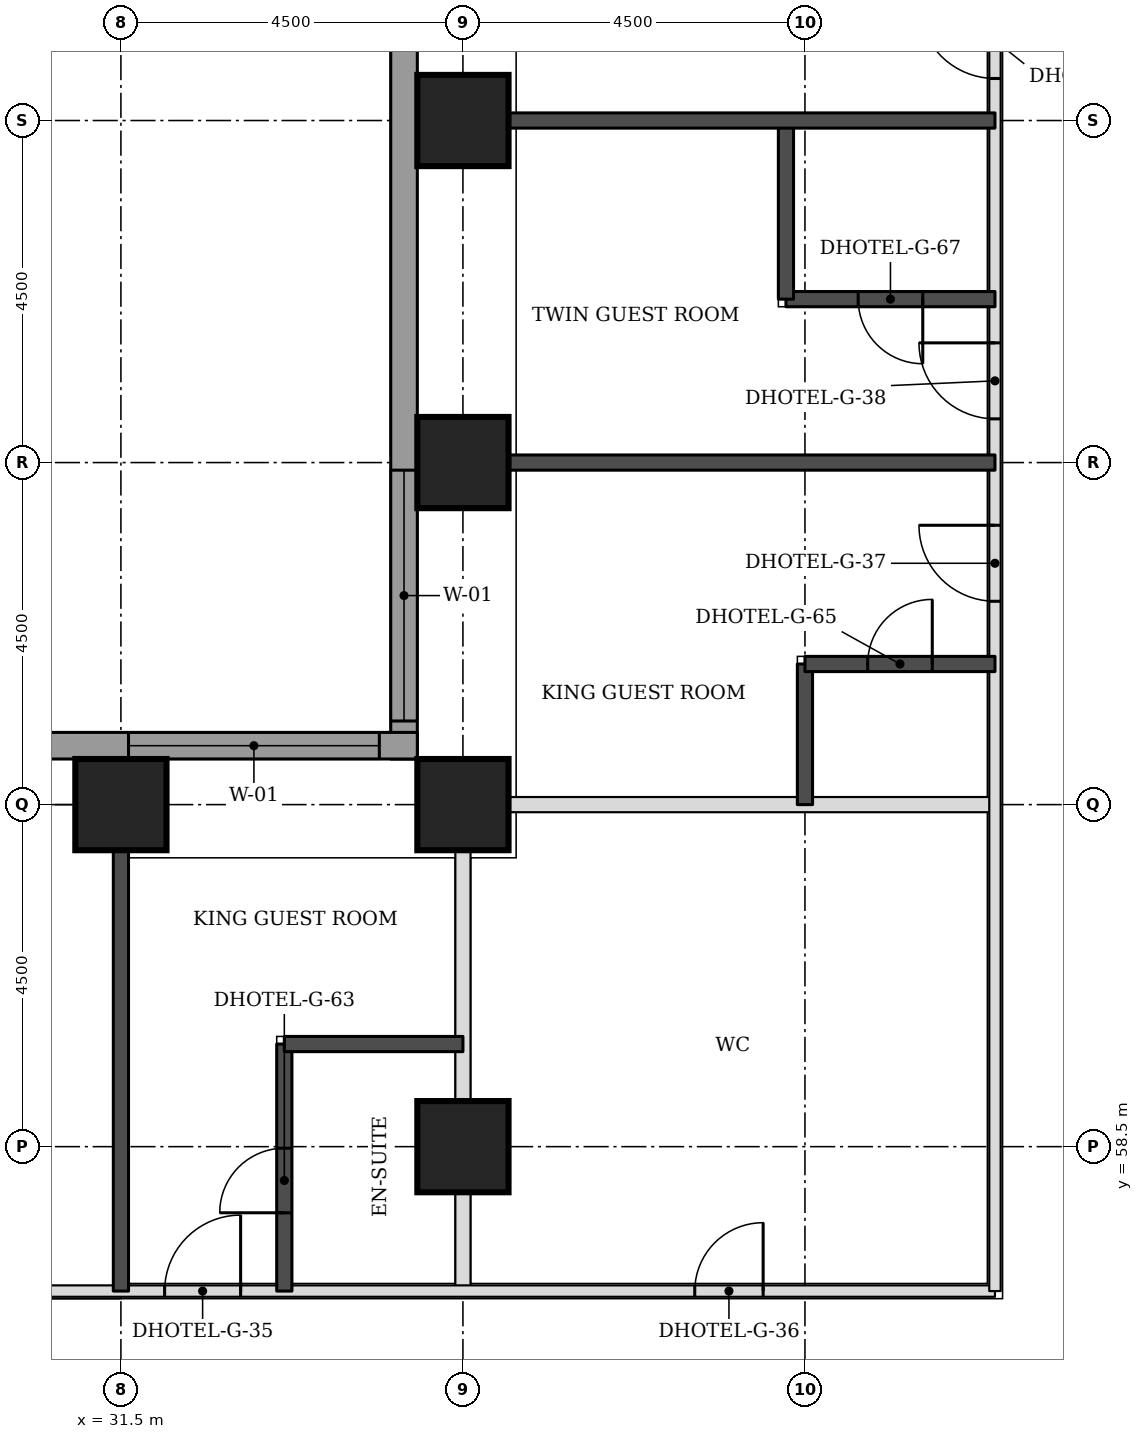
"""IFC4 building model, lengths in metres.
Left out: names, types, materials, properties, quantities, classifications, styles, units other than length and angle.
Written with IfcOpenShell. Run it as: python <this file> out.ifc"""

import sys

from ifc_helpers import new_model, si_unit, direction, frame, frame_2d, origin, origin_2d, place, context, subcontext, project, spatial, rectangle, extrude, element, fill, save


model = new_model("IFC4")
c1 = context("Model", 3, precision=1e-05, world=origin(), true_north=direction((0.0, 1.0)))
c2 = subcontext(c1, "Body", "Model", "MODEL_VIEW")
j1 = project(units=[si_unit("LENGTHUNIT", "METRE"), si_unit("PLANEANGLEUNIT", "RADIAN")], contexts=[c1])
p1 = place(None, origin())
s1 = spatial("IfcSite", under=j1, at=p1, CompositionType="ELEMENT")
p2 = place(p1, origin())
s2 = spatial("IfcBuilding", under=s1, at=p2, CompositionType="ELEMENT")
p3 = place(p2, frame((0.0, 0.0, 66.0)))
s3 = spatial("IfcBuildingStorey", under=s2, at=p3, CompositionType="ELEMENT", Elevation=66.0)
for number, where, z_axis, x_axis in (
    (1, (36.0, 58.5, 0.0), (0.0, 0.0, 1.0), (1.0, 0.0, 0.0)),
    (2, (31.5, 63.0, 0.0), (0.0, 0.0, 1.0), (1.0, 0.0, 0.0)),
    (3, (36.0, 63.0, 0.0), (0.0, 0.0, 1.0), (1.0, 0.0, 0.0)),
    (4, (36.0, 67.5, 0.0), (0.0, 0.0, 1.0), (1.0, 0.0, 0.0)),
    (5, (36.0, 72.0, 0.0), (0.0, 0.0, 1.0), (1.0, 0.0, 0.0)),
):
    element("IfcColumn", number, at=place(p3, frame(where, z_axis=z_axis, x_axis=x_axis)), inside=s3, PredefinedType="COLUMN", context=c2, shape_type="SweptSolid", body=[
        extrude(rectangle(XDim=1.2, YDim=1.2, at=origin_2d()), origin(), (0.0, 0.0, 1.0), 3.3),
    ])
p4 = place(p3, frame((35.225, 76.894, 0.0), z_axis=(0.0, 0.0, 1.0), x_axis=(0.0, -1.0, 0.0)))
e6 = element("IfcWall", 6, at=p4, inside=s3, PredefinedType="STANDARD", context=c2, shape_type="SweptSolid", body=[
    extrude(rectangle(XDim=13.293, YDim=0.35, at=frame_2d((6.647, 0.0))), origin(), (0.0, 0.0, 1.0), 3.055),
])
p5 = place(p4, frame((9.493, 0.0, 0.8)))
e7 = element("IfcOpeningElement", 7, at=p5, cuts=e6, PredefinedType="OPENING", context=c2, shape_type="SweptSolid", body=[
    extrude(rectangle(XDim=3.3, YDim=1.5, at=frame_2d((1.65, 0.75))), frame((0.0, 0.185, 0.0), z_axis=(0.0, -1.0, 0.0), x_axis=(1.0, 0.0, 0.0)), (0.0, 0.0, 1.0), 0.37),
])
p6 = place(p3, frame((35.4, 63.775, 0.0), z_axis=(0.0, 0.0, 1.0), x_axis=(-1.0, 0.0, 0.0)))
e8 = element("IfcWall", 8, at=p6, inside=s3, PredefinedType="STANDARD", context=c2, shape_type="SweptSolid", body=[
    extrude(rectangle(XDim=17.793, YDim=0.35, at=frame_2d((8.897, 0.0))), origin(), (0.0, 0.0, 1.0), 3.055),
])
p7 = place(p6, frame((0.5, 0.0, 0.8)))
e9 = element("IfcOpeningElement", 9, at=p7, cuts=e8, PredefinedType="OPENING", context=c2, shape_type="SweptSolid", body=[
    extrude(rectangle(XDim=3.3, YDim=1.5, at=frame_2d((1.65, 0.75))), frame((0.0, 0.185, 0.0), z_axis=(0.0, -1.0, 0.0), x_axis=(1.0, 0.0, 0.0)), (0.0, 0.0, 1.0), 0.37),
])
p8 = place(p6, frame((9.0, 0.0, 0.8)))
e10 = element("IfcOpeningElement", 10, at=p8, cuts=e8, PredefinedType="OPENING", context=c2, shape_type="SweptSolid", body=[
    extrude(rectangle(XDim=3.3, YDim=1.5, at=frame_2d((1.65, 0.75))), frame((0.0, 0.185, 0.0), z_axis=(0.0, -1.0, 0.0), x_axis=(1.0, 0.0, 0.0)), (0.0, 0.0, 1.0), 0.37),
])
p9 = place(p3, frame((36.0, 56.6, 0.0), z_axis=(0.0, 0.0, 1.0), x_axis=(0.0, 1.0, 0.0)))
e11 = element("IfcWall", 11, at=p9, inside=s3, PredefinedType="PARTITIONING", context=c2, shape_type="SweptSolid", body=[
    extrude(rectangle(XDim=5.8, YDim=0.2, at=frame_2d((2.9, 0.0))), origin(), (0.0, 0.0, 1.0), 2.33),
])
p10 = place(p3, frame((36.6, 63.0, 0.0), z_axis=(0.0, 0.0, 1.0), x_axis=(1.0, 0.0, 0.0)))
e12 = element("IfcWall", 12, at=p10, inside=s3, PredefinedType="PARTITIONING", context=c2, shape_type="SweptSolid", body=[
    extrude(rectangle(XDim=6.4, YDim=0.2, at=frame_2d((3.2, 0.0))), origin(), (0.0, 0.0, 1.0), 3.08),
])
p11 = place(p3, frame((29.38, 56.6, 0.0), z_axis=(0.0, 0.0, 1.0), x_axis=(1.0, 0.0, 0.0)))
e13 = element("IfcWall", 13, at=p11, inside=s3, PredefinedType="PARTITIONING", context=c2, shape_type="SweptSolid", body=[
    extrude(rectangle(XDim=13.62, YDim=0.15, at=frame_2d((6.81, 0.0))), origin(), (0.0, 0.0, 1.0), 3.08),
])
p12 = place(p11, frame((2.695, 0.0, 0.0)))
e14 = element("IfcOpeningElement", 14, at=p12, cuts=e13, PredefinedType="OPENING", context=c2, shape_type="SweptSolid", body=[
    extrude(rectangle(XDim=1.0, YDim=2.1, at=frame_2d((0.5, 1.05))), frame((0.0, 0.085, 0.0), z_axis=(0.0, -1.0, 0.0), x_axis=(1.0, 0.0, 0.0)), (0.0, 0.0, 1.0), 0.17),
])
p13 = place(p11, frame((9.67, 0.0, 0.0)))
e15 = element("IfcOpeningElement", 15, at=p13, cuts=e13, PredefinedType="OPENING", context=c2, shape_type="SweptSolid", body=[
    extrude(rectangle(XDim=0.9, YDim=2.1, at=frame_2d((0.45, 1.05))), frame((0.0, 0.085, 0.0), z_axis=(0.0, -1.0, 0.0), x_axis=(1.0, 0.0, 0.0)), (0.0, 0.0, 1.0), 0.17),
])
p14 = place(p3, frame((43.0, 56.6, 0.0), z_axis=(0.0, 0.0, 1.0), x_axis=(0.0, 1.0, 0.0)))
e16 = element("IfcWall", 16, at=p14, inside=s3, PredefinedType="PARTITIONING", context=c2, shape_type="SweptSolid", body=[
    extrude(rectangle(XDim=17.4, YDim=0.15, at=frame_2d((8.7, 0.0))), origin(), (0.0, 0.0, 1.0), 3.08),
])
p15 = place(p14, frame((9.075, 0.0, 0.0)))
e17 = element("IfcOpeningElement", 17, at=p15, cuts=e16, PredefinedType="OPENING", context=c2, shape_type="SweptSolid", body=[
    extrude(rectangle(XDim=1.0, YDim=2.1, at=frame_2d((0.5, 1.05))), frame((0.0, 0.085, 0.0), z_axis=(0.0, -1.0, 0.0), x_axis=(1.0, 0.0, 0.0)), (0.0, 0.0, 1.0), 0.17),
])
p16 = place(p14, frame((11.475, 0.0, 0.0)))
e18 = element("IfcOpeningElement", 18, at=p16, cuts=e16, PredefinedType="OPENING", context=c2, shape_type="SweptSolid", body=[
    extrude(rectangle(XDim=1.0, YDim=2.1, at=frame_2d((0.5, 1.05))), frame((0.0, 0.085, 0.0), z_axis=(0.0, -1.0, 0.0), x_axis=(1.0, 0.0, 0.0)), (0.0, 0.0, 1.0), 0.17),
])
p17 = place(p14, frame((15.953, 0.0, 0.0)))
e19 = element("IfcOpeningElement", 19, at=p17, cuts=e16, PredefinedType="OPENING", context=c2, shape_type="SweptSolid", body=[
    extrude(rectangle(XDim=1.0, YDim=2.1, at=frame_2d((0.5, 1.05))), frame((0.0, 0.085, 0.0), z_axis=(0.0, -1.0, 0.0), x_axis=(1.0, 0.0, 0.0)), (0.0, 0.0, 1.0), 0.17),
])
p18 = place(p3, frame((31.5, 56.6, 0.0), z_axis=(0.0, 0.0, 1.0), x_axis=(0.0, 1.0, 0.0)))
e20 = element("IfcWall", 20, at=p18, inside=s3, PredefinedType="SOLIDWALL", context=c2, shape_type="SweptSolid", body=[
    extrude(rectangle(XDim=5.8, YDim=0.2, at=frame_2d((2.9, 0.0))), origin(), (0.0, 0.0, 1.0), 3.08),
])
p19 = place(p3, frame((33.65, 56.6, 0.0), z_axis=(0.0, 0.0, 1.0), x_axis=(0.0, 1.0, 0.0)))
e21 = element("IfcWall", 21, at=p19, inside=s3, PredefinedType="SOLIDWALL", context=c2, shape_type="SweptSolid", body=[
    extrude(rectangle(XDim=3.25, YDim=0.2, at=frame_2d((1.625, 0.0))), origin(), (0.0, 0.0, 1.0), 3.08),
])
p20 = place(p19, frame((1.03, 0.0, 0.0)))
e22 = element("IfcOpeningElement", 22, at=p20, cuts=e21, PredefinedType="OPENING", context=c2, shape_type="SweptSolid", body=[
    extrude(rectangle(XDim=0.85, YDim=2.1, at=frame_2d((0.425, 1.05))), frame((0.0, 0.11, 0.0), z_axis=(0.0, -1.0, 0.0), x_axis=(1.0, 0.0, 0.0)), (0.0, 0.0, 1.0), 0.22),
])
p21 = place(p3, frame((33.65, 59.85, 0.0), z_axis=(0.0, 0.0, 1.0), x_axis=(1.0, 0.0, 0.0)))
e23 = element("IfcWall", 23, at=p21, inside=s3, PredefinedType="SOLIDWALL", context=c2, shape_type="SweptSolid", body=[
    extrude(rectangle(XDim=2.35, YDim=0.2, at=frame_2d((1.175, 0.0))), origin(), (0.0, 0.0, 1.0), 3.08),
])
p22 = place(p3, frame((40.5, 63.0, 0.0), z_axis=(0.0, 0.0, 1.0), x_axis=(0.0, 1.0, 0.0)))
e24 = element("IfcWall", 24, at=p22, inside=s3, PredefinedType="SOLIDWALL", context=c2, shape_type="SweptSolid", body=[
    extrude(rectangle(XDim=1.85, YDim=0.2, at=frame_2d((0.925, 0.0))), origin(), (0.0, 0.0, 1.0), 3.08),
])
p23 = place(p3, frame((40.5, 64.85, 0.0), z_axis=(0.0, 0.0, 1.0), x_axis=(1.0, 0.0, 0.0)))
e25 = element("IfcWall", 25, at=p23, inside=s3, PredefinedType="SOLIDWALL", context=c2, shape_type="SweptSolid", body=[
    extrude(rectangle(XDim=2.5, YDim=0.2, at=frame_2d((1.25, 0.0))), origin(), (0.0, 0.0, 1.0), 3.08),
])
p24 = place(p23, frame((0.825, 0.0, 0.0)))
e26 = element("IfcOpeningElement", 26, at=p24, cuts=e25, PredefinedType="OPENING", context=c2, shape_type="SweptSolid", body=[
    extrude(rectangle(XDim=0.85, YDim=2.1, at=frame_2d((0.425, 1.05))), frame((0.0, 0.11, 0.0), z_axis=(0.0, -1.0, 0.0), x_axis=(1.0, 0.0, 0.0)), (0.0, 0.0, 1.0), 0.22),
])
p25 = place(p3, frame((36.6, 67.5, 0.0), z_axis=(0.0, 0.0, 1.0), x_axis=(1.0, 0.0, 0.0)))
e27 = element("IfcWall", 27, at=p25, inside=s3, PredefinedType="SOLIDWALL", context=c2, shape_type="SweptSolid", body=[
    extrude(rectangle(XDim=6.4, YDim=0.2, at=frame_2d((3.2, 0.0))), origin(), (0.0, 0.0, 1.0), 3.08),
])
p26 = place(p3, frame((40.25, 69.65, 0.0), z_axis=(0.0, 0.0, 1.0), x_axis=(1.0, 0.0, 0.0)))
e28 = element("IfcWall", 28, at=p26, inside=s3, PredefinedType="SOLIDWALL", context=c2, shape_type="SweptSolid", body=[
    extrude(rectangle(XDim=2.75, YDim=0.2, at=frame_2d((1.375, 0.0))), origin(), (0.0, 0.0, 1.0), 3.08),
])
p27 = place(p26, frame((0.95, 0.0, 0.0)))
e29 = element("IfcOpeningElement", 29, at=p27, cuts=e28, PredefinedType="OPENING", context=c2, shape_type="SweptSolid", body=[
    extrude(rectangle(XDim=0.85, YDim=2.1, at=frame_2d((0.425, 1.05))), frame((0.0, 0.11, 0.0), z_axis=(0.0, -1.0, 0.0), x_axis=(1.0, 0.0, 0.0)), (0.0, 0.0, 1.0), 0.22),
])
p28 = place(p3, frame((40.25, 69.65, 0.0), z_axis=(0.0, 0.0, 1.0), x_axis=(0.0, 1.0, 0.0)))
e30 = element("IfcWall", 30, at=p28, inside=s3, PredefinedType="SOLIDWALL", context=c2, shape_type="SweptSolid", body=[
    extrude(rectangle(XDim=2.35, YDim=0.2, at=frame_2d((1.175, 0.0))), origin(), (0.0, 0.0, 1.0), 3.08),
])
p29 = place(p3, frame((36.6, 72.0, 0.0), z_axis=(0.0, 0.0, 1.0), x_axis=(1.0, 0.0, 0.0)))
e31 = element("IfcWall", 31, at=p29, inside=s3, PredefinedType="SOLIDWALL", context=c2, shape_type="SweptSolid", body=[
    extrude(rectangle(XDim=6.4, YDim=0.2, at=frame_2d((3.2, 0.0))), origin(), (0.0, 0.0, 1.0), 3.08),
])
p30 = place(p5, origin())
e32 = element("IfcWindow", 32, at=p30, inside=s3, PartitioningType="SINGLE_PANEL", PredefinedType="WINDOW", context=c2, shape_type="SweptSolid", body=[
    extrude(rectangle(XDim=3.3, YDim=1.5, at=frame_2d((1.65, 0.75))), frame((0.0, 0.085, 0.0), z_axis=(0.0, -1.0, 0.0), x_axis=(1.0, 0.0, 0.0)), (0.0, 0.0, 1.0), 0.06),
])
fill(e7, e32)
p31 = place(p7, origin())
e33 = element("IfcWindow", 33, at=p31, inside=s3, PartitioningType="SINGLE_PANEL", PredefinedType="WINDOW", context=c2, shape_type="SweptSolid", body=[
    extrude(rectangle(XDim=3.3, YDim=1.5, at=frame_2d((1.65, 0.75))), frame((0.0, 0.085, 0.0), z_axis=(0.0, -1.0, 0.0), x_axis=(1.0, 0.0, 0.0)), (0.0, 0.0, 1.0), 0.06),
])
fill(e9, e33)
p32 = place(p12, origin())
e34 = element("IfcDoor", 34, at=p32, inside=s3, OperationType="SINGLE_SWING_RIGHT", PredefinedType="DOOR", context=c2, shape_type="SweptSolid", body=[
    extrude(rectangle(XDim=1.0, YDim=2.1, at=frame_2d((0.5, 1.05))), frame((0.0, 0.025, 0.0), z_axis=(0.0, -1.0, 0.0), x_axis=(1.0, 0.0, 0.0)), (0.0, 0.0, 1.0), 0.05),
])
fill(e14, e34)
p33 = place(p20, origin())
e35 = element("IfcDoor", 35, at=p33, inside=s3, OperationType="SINGLE_SWING_LEFT", PredefinedType="DOOR", context=c2, shape_type="SweptSolid", body=[
    extrude(rectangle(XDim=0.85, YDim=2.1, at=frame_2d((0.425, 1.05))), frame((0.0, 0.025, 0.0), z_axis=(0.0, -1.0, 0.0), x_axis=(1.0, 0.0, 0.0)), (0.0, 0.0, 1.0), 0.05),
])
fill(e22, e35)
p34 = place(p15, origin())
e36 = element("IfcDoor", 36, at=p34, inside=s3, OperationType="SINGLE_SWING_RIGHT", PredefinedType="DOOR", context=c2, shape_type="SweptSolid", body=[
    extrude(rectangle(XDim=1.0, YDim=2.1, at=frame_2d((0.5, 1.05))), frame((0.0, 0.025, 0.0), z_axis=(0.0, -1.0, 0.0), x_axis=(1.0, 0.0, 0.0)), (0.0, 0.0, 1.0), 0.05),
])
fill(e17, e36)
p35 = place(p24, origin())
e37 = element("IfcDoor", 37, at=p35, inside=s3, OperationType="SINGLE_SWING_RIGHT", PredefinedType="DOOR", context=c2, shape_type="SweptSolid", body=[
    extrude(rectangle(XDim=0.85, YDim=2.1, at=frame_2d((0.425, 1.05))), frame((0.0, 0.025, 0.0), z_axis=(0.0, -1.0, 0.0), x_axis=(1.0, 0.0, 0.0)), (0.0, 0.0, 1.0), 0.05),
])
fill(e26, e37)
p36 = place(p16, origin())
e38 = element("IfcDoor", 38, at=p36, inside=s3, OperationType="SINGLE_SWING_RIGHT", PredefinedType="DOOR", context=c2, shape_type="SweptSolid", body=[
    extrude(rectangle(XDim=1.0, YDim=2.1, at=frame_2d((0.5, 1.05))), frame((0.0, 0.025, 0.0), z_axis=(0.0, -1.0, 0.0), x_axis=(1.0, 0.0, 0.0)), (0.0, 0.0, 1.0), 0.05),
])
fill(e18, e38)
p37 = place(p27, frame((0.85, 0.0, 0.0), z_axis=(0.0, 0.0, 1.0), x_axis=(-1.0, 0.0, 0.0)))
e39 = element("IfcDoor", 39, at=p37, inside=s3, OperationType="SINGLE_SWING_LEFT", PredefinedType="DOOR", context=c2, shape_type="SweptSolid", body=[
    extrude(rectangle(XDim=0.85, YDim=2.1, at=frame_2d((0.425, 1.05))), frame((0.0, 0.025, 0.0), z_axis=(0.0, -1.0, 0.0), x_axis=(1.0, 0.0, 0.0)), (0.0, 0.0, 1.0), 0.05),
])
fill(e29, e39)
p38 = place(p17, origin())
e40 = element("IfcDoor", 40, at=p38, inside=s3, OperationType="SINGLE_SWING_RIGHT", PredefinedType="DOOR", context=c2, shape_type="SweptSolid", body=[
    extrude(rectangle(XDim=1.0, YDim=2.1, at=frame_2d((0.5, 1.05))), frame((0.0, 0.025, 0.0), z_axis=(0.0, -1.0, 0.0), x_axis=(1.0, 0.0, 0.0)), (0.0, 0.0, 1.0), 0.05),
])
fill(e19, e40)
p39 = place(p13, origin())
e41 = element("IfcDoor", 41, at=p39, inside=s3, OperationType="SINGLE_SWING_RIGHT", PredefinedType="DOOR", context=c2, shape_type="SweptSolid", body=[
    extrude(rectangle(XDim=0.9, YDim=2.1, at=frame_2d((0.45, 1.05))), frame((0.0, 0.025, 0.0), z_axis=(0.0, -1.0, 0.0), x_axis=(1.0, 0.0, 0.0)), (0.0, 0.0, 1.0), 0.05),
])
fill(e15, e41)
save(model, sys.argv[1])
